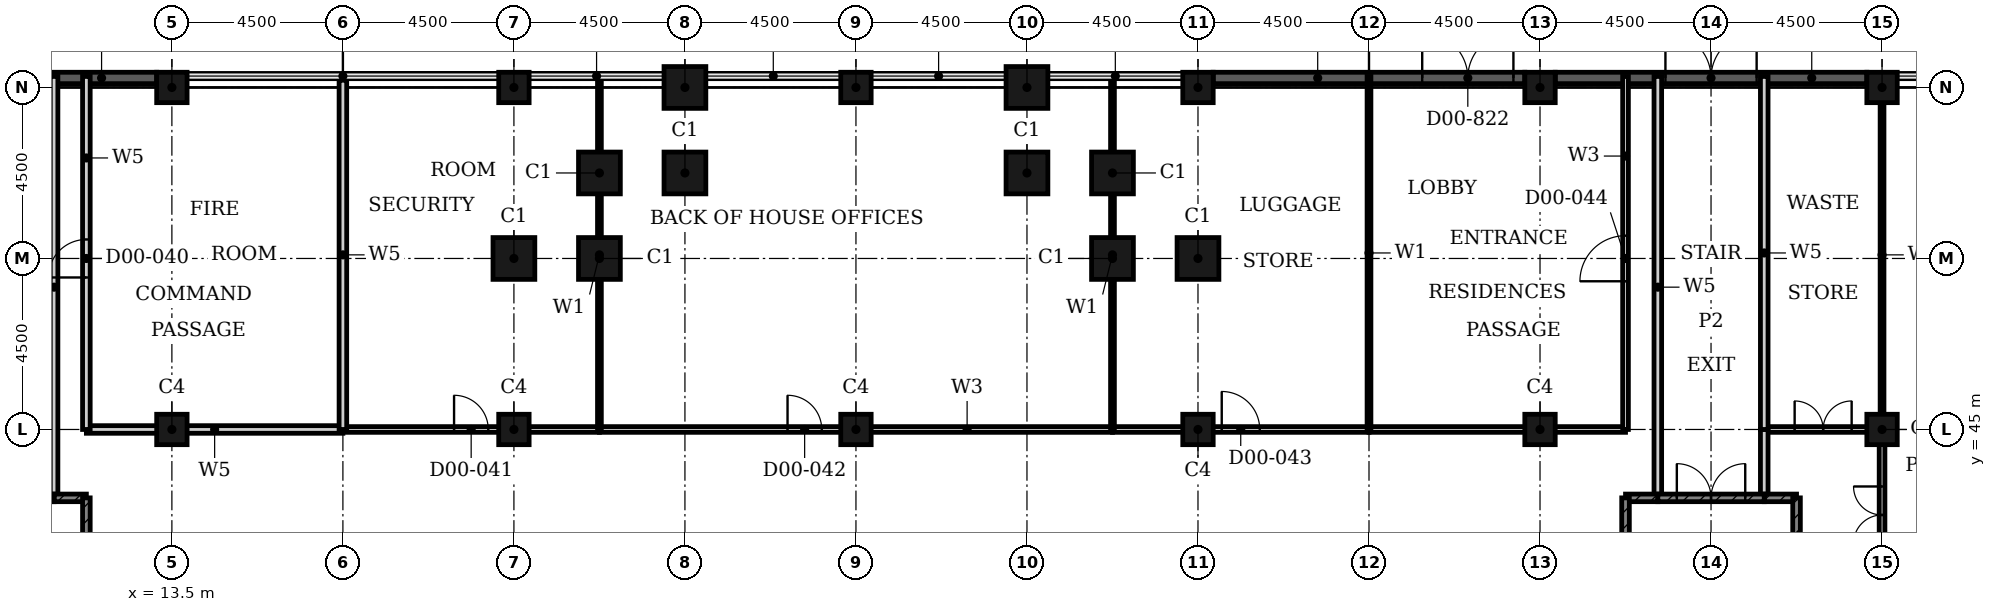
"""IFC4 building model, lengths in metres.
Left out: names, types, materials, properties, quantities, classifications, styles, units other than length and angle.
Written with IfcOpenShell. Run it as: python <this file> out.ifc"""

import sys

from ifc_helpers import new_model, si_unit, direction, frame, frame_2d, origin, origin_2d, place, context, subcontext, project, spatial, rectangle, hollow_rectangle, extrude, element, fill, save


model = new_model("IFC4")
c1 = context("Model", 3, precision=1e-05, world=origin(), true_north=direction((0.0, 1.0)))
c2 = subcontext(c1, "Body", "Model", "MODEL_VIEW")
j1 = project(units=[si_unit("LENGTHUNIT", "METRE"), si_unit("PLANEANGLEUNIT", "RADIAN")], contexts=[c1])
p1 = place(None, origin())
s1 = spatial("IfcSite", under=j1, at=p1, CompositionType="ELEMENT")
p2 = place(p1, origin())
s2 = spatial("IfcBuilding", under=s1, at=p2, CompositionType="ELEMENT")
p3 = place(p2, origin())
s3 = spatial("IfcBuildingStorey", under=s2, at=p3, CompositionType="ELEMENT", Elevation=0.0)
for number, where, z_axis, x_axis in (
    (1, (40.5, 49.5, 0.0), (0.0, 0.0, 1.0), (1.0, 0.0, 0.0)),
    (2, (38.25, 49.5, 0.0), (0.0, 0.0, 1.0), (1.0, 0.0, 0.0)),
    (3, (38.25, 51.75, 0.0), (0.0, 0.0, 1.0), (1.0, 0.0, 0.0)),
    (4, (36.0, 51.75, 0.0), (0.0, 0.0, 1.0), (1.0, 0.0, 0.0)),
    (5, (36.0, 54.0, 0.0), (0.0, 0.0, 1.0), (1.0, 0.0, 0.0)),
    (6, (27.0, 54.0, 0.0), (0.0, 0.0, 1.0), (1.0, 0.0, 0.0)),
    (7, (27.0, 51.75, 0.0), (0.0, 0.0, 1.0), (1.0, 0.0, 0.0)),
    (8, (24.75, 51.75, 0.0), (0.0, 0.0, 1.0), (1.0, 0.0, 0.0)),
    (9, (24.75, 49.5, 0.0), (0.0, 0.0, 1.0), (1.0, 0.0, 0.0)),
    (10, (22.5, 49.5, 0.0), (0.0, 0.0, 1.0), (1.0, 0.0, 0.0)),
):
    element("IfcColumn", number, at=place(p3, frame(where, z_axis=z_axis, x_axis=x_axis)), inside=s3, PredefinedType="COLUMN", context=c2, shape_type="SweptSolid", body=[
        extrude(hollow_rectangle(XDim=1.1, YDim=1.1, WallThickness=0.036, at=origin_2d()), origin(), (0.0, 0.0, 1.0), 6.6),
    ])
for number, where, z_axis, x_axis in (
    (11, (13.5, 54.0, 0.0), (0.0, 0.0, 1.0), (1.0, 0.0, 0.0)),
    (12, (22.5, 54.0, 0.0), (0.0, 0.0, 1.0), (1.0, 0.0, 0.0)),
    (13, (31.5, 54.0, 0.0), (0.0, 0.0, 1.0), (1.0, 0.0, 0.0)),
    (14, (40.5, 54.0, 0.0), (0.0, 0.0, 1.0), (1.0, 0.0, 0.0)),
    (15, (49.5, 54.0, 0.0), (0.0, 0.0, 1.0), (1.0, 0.0, 0.0)),
    (16, (58.5, 54.0, 0.0), (0.0, 0.0, 1.0), (1.0, 0.0, 0.0)),
    (17, (13.5, 45.0, 0.0), (0.0, 0.0, 1.0), (1.0, 0.0, 0.0)),
    (18, (22.5, 45.0, 0.0), (0.0, 0.0, 1.0), (1.0, 0.0, 0.0)),
    (19, (31.5, 45.0, 0.0), (0.0, 0.0, 1.0), (1.0, 0.0, 0.0)),
    (20, (40.5, 45.0, 0.0), (0.0, 0.0, 1.0), (1.0, 0.0, 0.0)),
    (21, (49.5, 45.0, 0.0), (0.0, 0.0, 1.0), (1.0, 0.0, 0.0)),
    (22, (58.5, 45.0, 0.0), (0.0, 0.0, 1.0), (1.0, 0.0, 0.0)),
):
    element("IfcColumn", number, at=place(p3, frame(where, z_axis=z_axis, x_axis=x_axis)), inside=s3, PredefinedType="COLUMN", context=c2, shape_type="SweptSolid", body=[
        extrude(hollow_rectangle(XDim=0.8, YDim=0.8, WallThickness=0.025, at=origin_2d()), origin(), (0.0, 0.0, 1.0), 6.6),
    ])
p4 = place(p3, frame((49.9, 54.25, 0.0), z_axis=(0.0, 0.0, 1.0), x_axis=(1.0, 0.0, 0.0)))
e23 = element("IfcWall", 23, at=p4, inside=s3, PredefinedType="SOLIDWALL", context=c2, shape_type="SweptSolid", body=[
    extrude(rectangle(XDim=8.2, YDim=0.3, at=frame_2d((4.1, 0.0))), origin(), (0.0, 0.0, 1.0), 6.6),
])
p5 = place(p4, frame((2.9, 0.0, 0.0)))
e24 = element("IfcOpeningElement", 24, at=p5, cuts=e23, PredefinedType="OPENING", context=c2, shape_type="SweptSolid", body=[
    extrude(rectangle(XDim=2.4, YDim=2.4, at=frame_2d((1.2, 1.2))), frame((0.0, 0.16, 0.0), z_axis=(0.0, -1.0, 0.0), x_axis=(1.0, 0.0, 0.0)), (0.0, 0.0, 1.0), 0.32),
])
p6 = place(p3, frame((40.9, 54.25, 0.0), z_axis=(0.0, 0.0, 1.0), x_axis=(1.0, 0.0, 0.0)))
e25 = element("IfcWall", 25, at=p6, inside=s3, PredefinedType="SOLIDWALL", context=c2, shape_type="SweptSolid", body=[
    extrude(rectangle(XDim=8.2, YDim=0.3, at=frame_2d((4.1, 0.0))), origin(), (0.0, 0.0, 1.0), 6.6),
])
p7 = place(p6, frame((5.5, 0.0, 0.0)))
e26 = element("IfcOpeningElement", 26, at=p7, cuts=e25, PredefinedType="OPENING", context=c2, shape_type="SweptSolid", body=[
    extrude(rectangle(XDim=2.4, YDim=2.4, at=frame_2d((1.2, 1.2))), frame((0.0, 0.16, 0.0), z_axis=(0.0, -1.0, 0.0), x_axis=(1.0, 0.0, 0.0)), (0.0, 0.0, 1.0), 0.32),
])
p8 = place(p3, frame((4.9, 54.25, 0.0), z_axis=(0.0, 0.0, 1.0), x_axis=(1.0, 0.0, 0.0)))
e27 = element("IfcWall", 27, at=p8, inside=s3, PredefinedType="SOLIDWALL", context=c2, shape_type="SweptSolid", body=[
    extrude(rectangle(XDim=8.2, YDim=0.3, at=frame_2d((4.1, 0.0))), origin(), (0.0, 0.0, 1.0), 6.6),
])
p9 = place(p8, frame((2.9, 0.0, 0.0)))
e28 = element("IfcOpeningElement", 28, at=p9, cuts=e27, PredefinedType="OPENING", context=c2, shape_type="SweptSolid", body=[
    extrude(rectangle(XDim=2.4, YDim=2.4, at=frame_2d((1.2, 1.2))), frame((0.0, 0.16, 0.0), z_axis=(0.0, -1.0, 0.0), x_axis=(1.0, 0.0, 0.0)), (0.0, 0.0, 1.0), 0.32),
])
p10 = place(p3, frame((18.0, 45.0, 0.0), z_axis=(0.0, 0.0, 1.0), x_axis=(1.0, 0.0, 0.0)))
e29 = element("IfcWall", 29, at=p10, inside=s3, PredefinedType="PARTITIONING", context=c2, shape_type="SweptSolid", body=[
    extrude(rectangle(XDim=6.75, YDim=0.15, at=frame_2d((3.375, 0.0))), origin(), (0.0, 0.0, 1.0), 6.25),
])
p11 = place(p10, frame((2.925, 0.0, 0.0)))
e30 = element("IfcOpeningElement", 30, at=p11, cuts=e29, PredefinedType="OPENING", context=c2, shape_type="SweptSolid", body=[
    extrude(rectangle(XDim=0.9, YDim=2.1, at=frame_2d((0.45, 1.05))), frame((0.0, 0.085, 0.0), z_axis=(0.0, -1.0, 0.0), x_axis=(1.0, 0.0, 0.0)), (0.0, 0.0, 1.0), 0.17),
])
p12 = place(p3, frame((24.75, 45.0, 0.0), z_axis=(0.0, 0.0, 1.0), x_axis=(1.0, 0.0, 0.0)))
e31 = element("IfcWall", 31, at=p12, inside=s3, PredefinedType="PARTITIONING", context=c2, shape_type="SweptSolid", body=[
    extrude(rectangle(XDim=13.5, YDim=0.15, at=frame_2d((6.75, 0.0))), origin(), (0.0, 0.0, 1.0), 6.25),
])
p13 = place(p12, frame((4.95, 0.0, 0.0)))
e32 = element("IfcOpeningElement", 32, at=p13, cuts=e31, PredefinedType="OPENING", context=c2, shape_type="SweptSolid", body=[
    extrude(rectangle(XDim=0.9, YDim=2.1, at=frame_2d((0.45, 1.05))), frame((0.0, 0.085, 0.0), z_axis=(0.0, -1.0, 0.0), x_axis=(1.0, 0.0, 0.0)), (0.0, 0.0, 1.0), 0.17),
])
p14 = place(p3, frame((38.25, 45.0, 0.0), z_axis=(0.0, 0.0, 1.0), x_axis=(1.0, 0.0, 0.0)))
e33 = element("IfcWall", 33, at=p14, inside=s3, PredefinedType="PARTITIONING", context=c2, shape_type="SweptSolid", body=[
    extrude(rectangle(XDim=6.75, YDim=0.15, at=frame_2d((3.375, 0.0))), origin(), (0.0, 0.0, 1.0), 6.25),
])
p15 = place(p14, frame((2.875, 0.0, 0.0)))
e34 = element("IfcOpeningElement", 34, at=p15, cuts=e33, PredefinedType="OPENING", context=c2, shape_type="SweptSolid", body=[
    extrude(rectangle(XDim=1.0, YDim=2.1, at=frame_2d((0.5, 1.05))), frame((0.0, 0.085, 0.0), z_axis=(0.0, -1.0, 0.0), x_axis=(1.0, 0.0, 0.0)), (0.0, 0.0, 1.0), 0.17),
])
p16 = place(p3, frame((45.0, 45.0, 0.0), z_axis=(0.0, 0.0, 1.0), x_axis=(1.0, 0.0, 0.0)))
e35 = element("IfcWall", 35, at=p16, inside=s3, PredefinedType="PARTITIONING", context=c2, shape_type="SweptSolid", body=[
    extrude(rectangle(XDim=6.75, YDim=0.15, at=frame_2d((3.375, 0.0))), origin(), (0.0, 0.0, 1.0), 6.25),
])
p17 = place(p3, frame((55.4, 45.0, 0.0), z_axis=(0.0, 0.0, 1.0), x_axis=(1.0, 0.0, 0.0)))
e36 = element("IfcWall", 36, at=p17, inside=s3, PredefinedType="PARTITIONING", context=c2, shape_type="SweptSolid", body=[
    extrude(rectangle(XDim=3.1, YDim=0.15, at=frame_2d((1.55, 0.0))), origin(), (0.0, 0.0, 1.0), 6.25),
])
p18 = place(p17, frame((0.8, 0.0, 0.0)))
e37 = element("IfcOpeningElement", 37, at=p18, cuts=e36, PredefinedType="OPENING", context=c2, shape_type="SweptSolid", body=[
    extrude(rectangle(XDim=1.5, YDim=2.4, at=frame_2d((0.75, 1.2))), frame((0.0, 0.085, 0.0), z_axis=(0.0, -1.0, 0.0), x_axis=(1.0, 0.0, 0.0)), (0.0, 0.0, 1.0), 0.17),
])
p19 = place(p3, frame((51.75, 45.0, 0.0), z_axis=(0.0, 0.0, 1.0), x_axis=(0.0, 1.0, 0.0)))
e38 = element("IfcWall", 38, at=p19, inside=s3, PredefinedType="PARTITIONING", context=c2, shape_type="SweptSolid", body=[
    extrude(rectangle(XDim=9.29, YDim=0.15, at=frame_2d((4.645, 0.0))), origin(), (0.0, 0.0, 1.0), 6.25),
])
p20 = place(p19, frame((3.9, 0.0, 0.0)))
e39 = element("IfcOpeningElement", 39, at=p20, cuts=e38, PredefinedType="OPENING", context=c2, shape_type="SweptSolid", body=[
    extrude(rectangle(XDim=1.2, YDim=2.4, at=frame_2d((0.6, 1.2))), frame((0.0, 0.085, 0.0), z_axis=(0.0, -1.0, 0.0), x_axis=(1.0, 0.0, 0.0)), (0.0, 0.0, 1.0), 0.17),
])
p21 = place(p3, frame((58.5, 40.5, 0.0), z_axis=(0.0, 0.0, 1.0), x_axis=(0.0, 1.0, 0.0)))
e40 = element("IfcWall", 40, at=p21, inside=s3, PredefinedType="PARTITIONING", context=c2, shape_type="SweptSolid", body=[
    extrude(rectangle(XDim=4.5, YDim=0.15, at=frame_2d((2.25, 0.0))), origin(), (0.0, 0.0, 1.0), 6.25),
])
p22 = place(p21, frame((1.5, 0.0, 0.0)))
e41 = element("IfcOpeningElement", 41, at=p22, cuts=e40, PredefinedType="OPENING", context=c2, shape_type="SweptSolid", body=[
    extrude(rectangle(XDim=1.5, YDim=2.4, at=frame_2d((0.75, 1.2))), frame((0.0, 0.085, 0.0), z_axis=(0.0, -1.0, 0.0), x_axis=(1.0, 0.0, 0.0)), (0.0, 0.0, 1.0), 0.17),
])
for number, where, z_axis, x_axis in (
    (42, (24.75, 45.0, 0.0), (0.0, 0.0, 1.0), (0.0, 1.0, 0.0)),
    (43, (38.25, 45.0, 0.0), (0.0, 0.0, 1.0), (0.0, 1.0, 0.0)),
):
    element("IfcWall", number, at=place(p3, frame(where, z_axis=z_axis, x_axis=x_axis)), inside=s3, PredefinedType="PARTITIONING", context=c2, shape_type="SweptSolid", body=[
        extrude(rectangle(XDim=9.19, YDim=0.1, at=frame_2d((4.595, 0.0))), origin(), (0.0, 0.0, 1.0), 6.25),
    ])
p23 = place(p3, frame((45.0, 45.0, 0.0), z_axis=(0.0, 0.0, 1.0), x_axis=(0.0, 1.0, 0.0)))
e44 = element("IfcWall", 44, at=p23, inside=s3, PredefinedType="PARTITIONING", context=c2, shape_type="SweptSolid", body=[
    extrude(rectangle(XDim=9.29, YDim=0.1, at=frame_2d((4.645, 0.0))), origin(), (0.0, 0.0, 1.0), 6.25),
])
p24 = place(p3, frame((58.5, 45.0, 0.0), z_axis=(0.0, 0.0, 1.0), x_axis=(0.0, 1.0, 0.0)))
e45 = element("IfcWall", 45, at=p24, inside=s3, PredefinedType="PARTITIONING", context=c2, shape_type="SweptSolid", body=[
    extrude(rectangle(XDim=9.19, YDim=0.1, at=frame_2d((4.595, 0.0))), origin(), (0.0, 0.0, 1.0), 6.25),
])
p25 = place(p3, frame((11.25, 45.0, 0.0), z_axis=(0.0, 0.0, 1.0), x_axis=(1.0, 0.0, 0.0)))
e46 = element("IfcWall", 46, at=p25, inside=s3, PredefinedType="PARTITIONING", context=c2, shape_type="SweptSolid", body=[
    extrude(rectangle(XDim=6.75, YDim=0.2, at=frame_2d((3.375, 0.0))), origin(), (0.0, 0.0, 1.0), 6.25),
])
p26 = place(p3, frame((10.4, 43.2, 0.0), z_axis=(0.0, 0.0, 1.0), x_axis=(0.0, 1.0, 0.0)))
e47 = element("IfcWall", 47, at=p26, inside=s3, PredefinedType="PARTITIONING", context=c2, shape_type="SweptSolid", body=[
    extrude(rectangle(XDim=11.09, YDim=0.2, at=frame_2d((5.545, 0.0))), origin(), (0.0, 0.0, 1.0), 6.25),
])
p27 = place(p3, frame((11.25, 45.0, 0.0), z_axis=(0.0, 0.0, 1.0), x_axis=(0.0, 1.0, 0.0)))
e48 = element("IfcWall", 48, at=p27, inside=s3, PredefinedType="PARTITIONING", context=c2, shape_type="SweptSolid", body=[
    extrude(rectangle(XDim=9.29, YDim=0.2, at=frame_2d((4.645, 0.0))), origin(), (0.0, 0.0, 1.0), 6.25),
])
p28 = place(p27, frame((4.0, 0.0, 0.0)))
e49 = element("IfcOpeningElement", 49, at=p28, cuts=e48, PredefinedType="OPENING", context=c2, shape_type="SweptSolid", body=[
    extrude(rectangle(XDim=1.0, YDim=2.1, at=frame_2d((0.5, 1.05))), frame((0.0, 0.11, 0.0), z_axis=(0.0, -1.0, 0.0), x_axis=(1.0, 0.0, 0.0)), (0.0, 0.0, 1.0), 0.22),
])
p29 = place(p3, frame((18.0, 45.0, 0.0), z_axis=(0.0, 0.0, 1.0), x_axis=(0.0, 1.0, 0.0)))
e50 = element("IfcWall", 50, at=p29, inside=s3, PredefinedType="PARTITIONING", context=c2, shape_type="SweptSolid", body=[
    extrude(rectangle(XDim=9.19, YDim=0.2, at=frame_2d((4.595, 0.0))), origin(), (0.0, 0.0, 1.0), 6.25),
])
p30 = place(p3, frame((52.6, 43.2, 0.0), z_axis=(0.0, 0.0, 1.0), x_axis=(0.0, 1.0, 0.0)))
e51 = element("IfcWall", 51, at=p30, inside=s3, PredefinedType="PARTITIONING", context=c2, shape_type="SweptSolid", body=[
    extrude(rectangle(XDim=11.09, YDim=0.2, at=frame_2d((5.545, 0.0))), origin(), (0.0, 0.0, 1.0), 6.25),
])
p31 = place(p3, frame((55.4, 43.2, 0.0), z_axis=(0.0, 0.0, 1.0), x_axis=(0.0, 1.0, 0.0)))
e52 = element("IfcWall", 52, at=p31, inside=s3, PredefinedType="PARTITIONING", context=c2, shape_type="SweptSolid", body=[
    extrude(rectangle(XDim=1.8, YDim=0.2, at=frame_2d((0.9, 0.0))), origin(), (0.0, 0.0, 1.0), 6.25),
])
p32 = place(p3, frame((55.4, 45.0, 0.0), z_axis=(0.0, 0.0, 1.0), x_axis=(0.0, 1.0, 0.0)))
e53 = element("IfcWall", 53, at=p32, inside=s3, PredefinedType="PARTITIONING", context=c2, shape_type="SweptSolid", body=[
    extrude(rectangle(XDim=9.29, YDim=0.2, at=frame_2d((4.645, 0.0))), origin(), (0.0, 0.0, 1.0), 6.25),
])
p33 = place(p3, frame((10.4, 43.2, 0.0), z_axis=(0.0, 0.0, 1.0), x_axis=(1.0, 0.0, 0.0)))
e54 = element("IfcWall", 54, at=p33, inside=s3, PredefinedType="SHEAR", context=c2, shape_type="SweptSolid", body=[
    extrude(rectangle(XDim=0.85, YDim=0.2, at=frame_2d((0.425, 0.0))), origin(), (0.0, 0.0, 1.0), 6.25),
])
p34 = place(p3, frame((7.6, 43.2, 0.0), z_axis=(0.0, 0.0, 1.0), x_axis=(1.0, 0.0, 0.0)))
e55 = element("IfcWall", 55, at=p34, inside=s3, PredefinedType="SHEAR", context=c2, shape_type="SweptSolid", body=[
    extrude(rectangle(XDim=2.8, YDim=0.2, at=frame_2d((1.4, 0.0))), origin(), (0.0, 0.0, 1.0), 6.25),
])
p35 = place(p34, frame((0.5, 0.0, 0.0)))
e56 = element("IfcOpeningElement", 56, at=p35, cuts=e55, PredefinedType="OPENING", context=c2, shape_type="SweptSolid", body=[
    extrude(rectangle(XDim=1.8, YDim=2.1, at=frame_2d((0.9, 1.05))), frame((0.0, 0.11, 0.0), z_axis=(0.0, -1.0, 0.0), x_axis=(1.0, 0.0, 0.0)), (0.0, 0.0, 1.0), 0.22),
])
for number, where, z_axis, x_axis in (
    (57, (51.75, 43.2, 0.0), (0.0, 0.0, 1.0), (1.0, 0.0, 0.0)),
    (58, (55.4, 43.2, 0.0), (0.0, 0.0, 1.0), (1.0, 0.0, 0.0)),
):
    element("IfcWall", number, at=place(p3, frame(where, z_axis=z_axis, x_axis=x_axis)), inside=s3, PredefinedType="SHEAR", context=c2, shape_type="SweptSolid", body=[
        extrude(rectangle(XDim=0.85, YDim=0.2, at=frame_2d((0.425, 0.0))), origin(), (0.0, 0.0, 1.0), 6.25),
    ])
p36 = place(p3, frame((52.6, 43.2, 0.0), z_axis=(0.0, 0.0, 1.0), x_axis=(1.0, 0.0, 0.0)))
e59 = element("IfcWall", 59, at=p36, inside=s3, PredefinedType="SHEAR", context=c2, shape_type="SweptSolid", body=[
    extrude(rectangle(XDim=2.8, YDim=0.2, at=frame_2d((1.4, 0.0))), origin(), (0.0, 0.0, 1.0), 6.25),
])
p37 = place(p36, frame((0.5, 0.0, 0.0)))
e60 = element("IfcOpeningElement", 60, at=p37, cuts=e59, PredefinedType="OPENING", context=c2, shape_type="SweptSolid", body=[
    extrude(rectangle(XDim=1.8, YDim=2.1, at=frame_2d((0.9, 1.05))), frame((0.0, 0.11, 0.0), z_axis=(0.0, -1.0, 0.0), x_axis=(1.0, 0.0, 0.0)), (0.0, 0.0, 1.0), 0.22),
])
for number, where, z_axis, x_axis in (
    (61, (11.25, 34.75, 0.0), (0.0, 0.0, 1.0), (0.0, 1.0, 0.0)),
    (62, (51.75, 34.75, 0.0), (0.0, 0.0, 1.0), (0.0, 1.0, 0.0)),
    (63, (56.25, 34.75, 0.0), (0.0, 0.0, 1.0), (0.0, 1.0, 0.0)),
):
    element("IfcWall", number, at=place(p3, frame(where, z_axis=z_axis, x_axis=x_axis)), inside=s3, PredefinedType="SHEAR", context=c2, shape_type="SweptSolid", body=[
        extrude(rectangle(XDim=8.45, YDim=0.2, at=frame_2d((4.225, 0.0))), origin(), (0.0, 0.0, 1.0), 6.25),
    ])
p38 = place(p5, origin())
e64 = element("IfcDoor", 64, at=p38, inside=s3, OperationType="DOUBLE_DOOR_SINGLE_SWING", PredefinedType="DOOR", context=c2, shape_type="SweptSolid", body=[
    extrude(rectangle(XDim=2.4, YDim=2.4, at=frame_2d((1.2, 1.2))), frame((0.0, 0.025, 0.0), z_axis=(0.0, -1.0, 0.0), x_axis=(1.0, 0.0, 0.0)), (0.0, 0.0, 1.0), 0.05),
])
fill(e24, e64)
p39 = place(p7, origin())
e65 = element("IfcDoor", 65, at=p39, inside=s3, OperationType="DOUBLE_DOOR_SINGLE_SWING", PredefinedType="DOOR", context=c2, shape_type="SweptSolid", body=[
    extrude(rectangle(XDim=2.4, YDim=2.4, at=frame_2d((1.2, 1.2))), frame((0.0, 0.025, 0.0), z_axis=(0.0, -1.0, 0.0), x_axis=(1.0, 0.0, 0.0)), (0.0, 0.0, 1.0), 0.05),
])
fill(e26, e65)
p40 = place(p37, origin())
e66 = element("IfcDoor", 66, at=p40, inside=s3, OperationType="DOUBLE_DOOR_SINGLE_SWING", PredefinedType="DOOR", context=c2, shape_type="SweptSolid", body=[
    extrude(rectangle(XDim=1.8, YDim=2.1, at=frame_2d((0.9, 1.05))), frame((0.0, 0.025, 0.0), z_axis=(0.0, -1.0, 0.0), x_axis=(1.0, 0.0, 0.0)), (0.0, 0.0, 1.0), 0.05),
])
fill(e60, e66)
p41 = place(p22, origin())
e67 = element("IfcDoor", 67, at=p41, inside=s3, OperationType="DOUBLE_DOOR_SINGLE_SWING", PredefinedType="DOOR", context=c2, shape_type="SweptSolid", body=[
    extrude(rectangle(XDim=1.5, YDim=2.4, at=frame_2d((0.75, 1.2))), frame((0.0, 0.025, 0.0), z_axis=(0.0, -1.0, 0.0), x_axis=(1.0, 0.0, 0.0)), (0.0, 0.0, 1.0), 0.05),
])
fill(e41, e67)
p42 = place(p28, origin())
e68 = element("IfcDoor", 68, at=p42, inside=s3, OperationType="SINGLE_SWING_LEFT", PredefinedType="DOOR", context=c2, shape_type="SweptSolid", body=[
    extrude(rectangle(XDim=1.0, YDim=2.1, at=frame_2d((0.5, 1.05))), frame((0.0, 0.025, 0.0), z_axis=(0.0, -1.0, 0.0), x_axis=(1.0, 0.0, 0.0)), (0.0, 0.0, 1.0), 0.05),
])
fill(e49, e68)
p43 = place(p11, origin())
e69 = element("IfcDoor", 69, at=p43, inside=s3, OperationType="SINGLE_SWING_RIGHT", PredefinedType="DOOR", context=c2, shape_type="SweptSolid", body=[
    extrude(rectangle(XDim=0.9, YDim=2.1, at=frame_2d((0.45, 1.05))), frame((0.0, 0.025, 0.0), z_axis=(0.0, -1.0, 0.0), x_axis=(1.0, 0.0, 0.0)), (0.0, 0.0, 1.0), 0.05),
])
fill(e30, e69)
p44 = place(p13, origin())
e70 = element("IfcDoor", 70, at=p44, inside=s3, OperationType="SINGLE_SWING_LEFT", PredefinedType="DOOR", context=c2, shape_type="SweptSolid", body=[
    extrude(rectangle(XDim=0.9, YDim=2.1, at=frame_2d((0.45, 1.05))), frame((0.0, 0.025, 0.0), z_axis=(0.0, -1.0, 0.0), x_axis=(1.0, 0.0, 0.0)), (0.0, 0.0, 1.0), 0.05),
])
fill(e32, e70)
p45 = place(p15, origin())
e71 = element("IfcDoor", 71, at=p45, inside=s3, OperationType="SINGLE_SWING_RIGHT", PredefinedType="DOOR", context=c2, shape_type="SweptSolid", body=[
    extrude(rectangle(XDim=1.0, YDim=2.1, at=frame_2d((0.5, 1.05))), frame((0.0, 0.025, 0.0), z_axis=(0.0, -1.0, 0.0), x_axis=(1.0, 0.0, 0.0)), (0.0, 0.0, 1.0), 0.05),
])
fill(e34, e71)
p46 = place(p20, origin())
e72 = element("IfcDoor", 72, at=p46, inside=s3, OperationType="SINGLE_SWING_RIGHT", PredefinedType="DOOR", context=c2, shape_type="SweptSolid", body=[
    extrude(rectangle(XDim=1.2, YDim=2.4, at=frame_2d((0.6, 1.2))), frame((0.0, 0.025, 0.0), z_axis=(0.0, -1.0, 0.0), x_axis=(1.0, 0.0, 0.0)), (0.0, 0.0, 1.0), 0.05),
])
fill(e39, e72)
p47 = place(p18, origin())
e73 = element("IfcDoor", 73, at=p47, inside=s3, OperationType="DOUBLE_DOOR_SINGLE_SWING", PredefinedType="DOOR", context=c2, shape_type="SweptSolid", body=[
    extrude(rectangle(XDim=1.5, YDim=2.4, at=frame_2d((0.75, 1.2))), frame((0.0, 0.025, 0.0), z_axis=(0.0, -1.0, 0.0), x_axis=(1.0, 0.0, 0.0)), (0.0, 0.0, 1.0), 0.05),
])
fill(e37, e73)
save(model, sys.argv[1])
